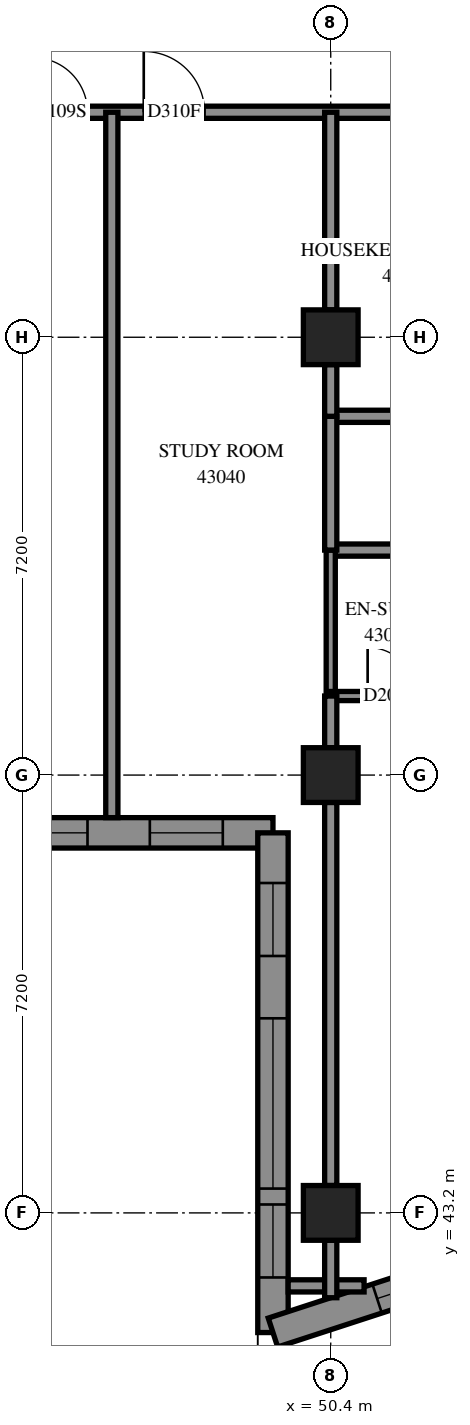
"""IFC4 building model, lengths in metres.
Left out: names, types, materials, properties, quantities, classifications, styles, units other than length and angle.
Written with IfcOpenShell. Run it as: python <this file> out.ifc"""

import sys

from ifc_helpers import new_model, si_unit, direction, frame, frame_2d, origin, origin_2d, place, context, subcontext, project, spatial, polyline, rectangle, outline, extrude, element, fill, save


model = new_model("IFC4")
c1 = context("Model", 3, precision=1e-05, world=origin(), true_north=direction((0.0, 1.0)))
c2 = subcontext(c1, "Body", "Model", "MODEL_VIEW")
j1 = project(units=[si_unit("LENGTHUNIT", "METRE"), si_unit("PLANEANGLEUNIT", "RADIAN")], contexts=[c1])
p1 = place(None, origin())
s1 = spatial("IfcSite", under=j1, at=p1, CompositionType="ELEMENT")
p2 = place(p1, origin())
s2 = spatial("IfcBuilding", under=s1, at=p2, CompositionType="ELEMENT")
p3 = place(p2, frame((0.0, 0.0, 159.2)))
s3 = spatial("IfcBuildingStorey", under=s2, at=p3, CompositionType="ELEMENT", Elevation=159.2)
for number, where, z_axis, x_axis in (
    (1, (50.4, 43.2, 0.0), (0.0, 0.0, 1.0), (1.0, 0.0, 0.0)),
    (2, (50.4, 50.4, 0.0), (0.0, 0.0, 1.0), (1.0, 0.0, 0.0)),
    (3, (50.4, 57.6, 0.0), (0.0, 0.0, 1.0), (1.0, 0.0, 0.0)),
):
    element("IfcColumn", number, at=place(p3, frame(where, z_axis=z_axis, x_axis=x_axis)), inside=s3, PredefinedType="COLUMN", context=c2, shape_type="SweptSolid", body=[
        extrude(rectangle(XDim=0.9, YDim=0.9, at=origin_2d()), origin(), (0.0, 0.0, 1.0), 3.1),
    ])
p4 = place(p3, frame((42.25, 49.45, 0.0), z_axis=(0.0, 0.0, 1.0), x_axis=(1.0, 0.0, 0.0)))
e4 = element("IfcWall", 4, at=p4, inside=s3, PredefinedType="SOLIDWALL", context=c2, shape_type="SweptSolid", body=[
    extrude(outline(polyline([(-0.25, -0.25), (6.95, -0.25), (7.45, 0.25), (0.25, 0.25), (-0.25, -0.25)])), origin(), (0.0, 0.0, 1.0), 3.1),
])
p5 = place(p4, frame((1.35, 0.0, 0.45)))
e5 = element("IfcOpeningElement", 5, at=p5, cuts=e4, PredefinedType="OPENING", context=c2, shape_type="SweptSolid", body=[
    extrude(rectangle(XDim=2.8, YDim=2.5, at=frame_2d((1.4, 1.25))), frame((0.0, 0.26, 0.0), z_axis=(0.0, -1.0, 0.0), x_axis=(1.0, 0.0, 0.0)), (0.0, 0.0, 1.0), 0.52),
])
p6 = place(p4, frame((5.175, 0.0, 0.45)))
e6 = element("IfcOpeningElement", 6, at=p6, cuts=e4, PredefinedType="OPENING", context=c2, shape_type="SweptSolid", body=[
    extrude(rectangle(XDim=1.2, YDim=2.5, at=frame_2d((0.6, 1.25))), frame((0.0, 0.26, 0.0), z_axis=(0.0, -1.0, 0.0), x_axis=(1.0, 0.0, 0.0)), (0.0, 0.0, 1.0), 0.52),
])
p7 = place(p3, frame((49.45, 49.45, 0.0), z_axis=(0.0, 0.0, 1.0), x_axis=(0.0, -1.0, 0.0)))
e7 = element("IfcWall", 7, at=p7, inside=s3, PredefinedType="SOLIDWALL", context=c2, shape_type="SweptSolid", body=[
    extrude(outline(polyline([(0.25, -0.25), (8.562, -0.25), (7.873, 0.25), (-0.25, 0.25), (0.25, -0.25)])), origin(), (0.0, 0.0, 1.0), 3.1),
])
p8 = place(p7, frame((3.05, 0.0, 0.45)))
e8 = element("IfcOpeningElement", 8, at=p8, cuts=e7, PredefinedType="OPENING", context=c2, shape_type="SweptSolid", body=[
    extrude(rectangle(XDim=2.8, YDim=2.5, at=frame_2d((1.4, 1.25))), frame((0.0, 0.26, 0.0), z_axis=(0.0, -1.0, 0.0), x_axis=(1.0, 0.0, 0.0)), (0.0, 0.0, 1.0), 0.52),
])
p9 = place(p7, frame((0.825, 0.0, 0.45)))
e9 = element("IfcOpeningElement", 9, at=p9, cuts=e7, PredefinedType="OPENING", context=c2, shape_type="SweptSolid", body=[
    extrude(rectangle(XDim=1.2, YDim=2.5, at=frame_2d((0.6, 1.25))), frame((0.0, 0.26, 0.0), z_axis=(0.0, -1.0, 0.0), x_axis=(1.0, 0.0, 0.0)), (0.0, 0.0, 1.0), 0.52),
])
p10 = place(p7, frame((6.112, 0.0, 0.45)))
e10 = element("IfcOpeningElement", 10, at=p10, cuts=e7, PredefinedType="OPENING", context=c2, shape_type="SweptSolid", body=[
    extrude(rectangle(XDim=1.2, YDim=2.5, at=frame_2d((0.6, 1.25))), frame((0.0, 0.26, 0.0), z_axis=(0.0, -1.0, 0.0), x_axis=(1.0, 0.0, 0.0)), (0.0, 0.0, 1.0), 0.52),
])
p11 = place(p3, frame((49.45, 41.232, 0.0), z_axis=(0.0, 0.0, 1.0), x_axis=(0.9507752204, 0.3098813971, 0.0)))
e11 = element("IfcWall", 11, at=p11, inside=s3, PredefinedType="SOLIDWALL", context=c2, shape_type="SweptSolid", body=[
    extrude(outline(polyline([(-0.344, -0.25), (3.244, -0.25), (3.362, 0.25), (0.344, 0.25), (-0.344, -0.25)])), origin(), (0.0, 0.0, 1.0), 3.1),
])
p12 = place(p11, frame((1.801, 0.0, 0.45)))
e12 = element("IfcOpeningElement", 12, at=p12, cuts=e11, PredefinedType="OPENING", context=c2, shape_type="SweptSolid", body=[
    extrude(rectangle(XDim=1.2, YDim=2.5, at=frame_2d((0.6, 1.25))), frame((0.0, 0.26, 0.0), z_axis=(0.0, -1.0, 0.0), x_axis=(1.0, 0.0, 0.0)), (0.0, 0.0, 1.0), 0.52),
])
p13 = place(p3, frame((36.0, 61.3, 0.0), z_axis=(0.0, 0.0, 1.0), x_axis=(1.0, 0.0, 0.0)))
e13 = element("IfcWall", 13, at=p13, inside=s3, PredefinedType="PARTITIONING", context=c2, shape_type="SweptSolid", body=[
    extrude(rectangle(XDim=16.9, YDim=0.2, at=frame_2d((8.45, 0.0))), origin(), (0.0, 0.0, 1.0), 3.1),
])
p14 = place(p13, frame((2.3, 0.0, 0.0)))
e14 = element("IfcOpeningElement", 14, at=p14, cuts=e13, PredefinedType="OPENING", context=c2, shape_type="SweptSolid", body=[
    extrude(rectangle(XDim=0.9, YDim=2.1, at=frame_2d((0.45, 1.05))), frame((0.0, 0.11, 0.0), z_axis=(0.0, -1.0, 0.0), x_axis=(1.0, 0.0, 0.0)), (0.0, 0.0, 1.0), 0.22),
])
p15 = place(p13, frame((4.125, 0.0, 0.0)))
e15 = element("IfcOpeningElement", 15, at=p15, cuts=e13, PredefinedType="OPENING", context=c2, shape_type="SweptSolid", body=[
    extrude(rectangle(XDim=1.0, YDim=2.1, at=frame_2d((0.5, 1.05))), frame((0.0, 0.11, 0.0), z_axis=(0.0, -1.0, 0.0), x_axis=(1.0, 0.0, 0.0)), (0.0, 0.0, 1.0), 0.22),
])
p16 = place(p13, frame((9.5, 0.0, 0.0)))
e16 = element("IfcOpeningElement", 16, at=p16, cuts=e13, PredefinedType="OPENING", context=c2, shape_type="SweptSolid", body=[
    extrude(rectangle(XDim=0.9, YDim=2.1, at=frame_2d((0.45, 1.05))), frame((0.0, 0.11, 0.0), z_axis=(0.0, -1.0, 0.0), x_axis=(1.0, 0.0, 0.0)), (0.0, 0.0, 1.0), 0.22),
])
p17 = place(p13, frame((11.325, 0.0, 0.0)))
e17 = element("IfcOpeningElement", 17, at=p17, cuts=e13, PredefinedType="OPENING", context=c2, shape_type="SweptSolid", body=[
    extrude(rectangle(XDim=1.0, YDim=2.1, at=frame_2d((0.5, 1.05))), frame((0.0, 0.11, 0.0), z_axis=(0.0, -1.0, 0.0), x_axis=(1.0, 0.0, 0.0)), (0.0, 0.0, 1.0), 0.22),
])
p18 = place(p13, frame((15.647, 0.0, 0.0)))
e18 = element("IfcOpeningElement", 18, at=p18, cuts=e13, PredefinedType="OPENING", context=c2, shape_type="SweptSolid", body=[
    extrude(rectangle(XDim=1.0, YDim=2.1, at=frame_2d((0.5, 1.05))), frame((0.0, 0.11, 0.0), z_axis=(0.0, -1.0, 0.0), x_axis=(1.0, 0.0, 0.0)), (0.0, 0.0, 1.0), 0.22),
])
p19 = place(p3, frame((46.8, 49.7, 0.0), z_axis=(0.0, 0.0, 1.0), x_axis=(0.0, 1.0, 0.0)))
e19 = element("IfcWall", 19, at=p19, inside=s3, PredefinedType="PARTITIONING", context=c2, shape_type="SweptSolid", body=[
    extrude(rectangle(XDim=11.6, YDim=0.2, at=frame_2d((5.8, 0.0))), origin(), (0.0, 0.0, 1.0), 3.1),
])
p20 = place(p3, frame((50.4, 43.65, 0.0), z_axis=(0.0, 0.0, 1.0), x_axis=(0.0, 1.0, 0.0)))
e20 = element("IfcWall", 20, at=p20, inside=s3, PredefinedType="PARTITIONING", context=c2, shape_type="SweptSolid", body=[
    extrude(rectangle(XDim=6.3, YDim=0.2, at=frame_2d((3.15, 0.0))), origin(), (0.0, 0.0, 1.0), 2.6),
])
p21 = place(p3, frame((50.4, 54.1, 0.0), z_axis=(0.0, 0.0, 1.0), x_axis=(1.0, 0.0, 0.0)))
e21 = element("IfcWall", 21, at=p21, inside=s3, PredefinedType="PARTITIONING", context=c2, shape_type="SweptSolid", body=[
    extrude(rectangle(XDim=4.5, YDim=0.2, at=frame_2d((2.25, 0.0))), origin(), (0.0, 0.0, 1.0), 3.1),
])
p22 = place(p21, frame((2.3, 0.0, 0.0)))
e22 = element("IfcOpeningElement", 22, at=p22, cuts=e21, PredefinedType="OPENING", context=c2, shape_type="SweptSolid", body=[
    extrude(rectangle(XDim=0.9, YDim=2.1, at=frame_2d((0.45, 1.05))), frame((0.0, 0.11, 0.0), z_axis=(0.0, -1.0, 0.0), x_axis=(1.0, 0.0, 0.0)), (0.0, 0.0, 1.0), 0.22),
])
p23 = place(p3, frame((50.4, 58.05, 0.0), z_axis=(0.0, 0.0, 1.0), x_axis=(0.0, 1.0, 0.0)))
e23 = element("IfcWall", 23, at=p23, inside=s3, PredefinedType="PARTITIONING", context=c2, shape_type="SweptSolid", body=[
    extrude(rectangle(XDim=3.25, YDim=0.2, at=frame_2d((1.625, 0.0))), origin(), (0.0, 0.0, 1.0), 3.1),
])
p24 = place(p3, frame((50.4, 56.3, 0.0), z_axis=(0.0, 0.0, 1.0), x_axis=(1.0, 0.0, 0.0)))
e24 = element("IfcWall", 24, at=p24, inside=s3, PredefinedType="PARTITIONING", context=c2, shape_type="SweptSolid", body=[
    extrude(rectangle(XDim=2.5, YDim=0.2, at=frame_2d((1.25, 0.0))), origin(), (0.0, 0.0, 1.0), 3.1),
])
p25 = place(p3, frame((50.4, 51.7, 0.0), z_axis=(0.0, 0.0, 1.0), x_axis=(0.0, 1.0, 0.0)))
e25 = element("IfcWall", 25, at=p25, inside=s3, PredefinedType="PARTITIONING", context=c2, shape_type="SweptSolid", body=[
    extrude(rectangle(XDim=2.4, YDim=0.15, at=frame_2d((1.2, 0.0))), origin(), (0.0, 0.0, 1.0), 3.1),
])
p26 = place(p3, frame((50.4, 54.1, 0.0), z_axis=(0.0, 0.0, 1.0), x_axis=(0.0, 1.0, 0.0)))
e26 = element("IfcWall", 26, at=p26, inside=s3, PredefinedType="PARTITIONING", context=c2, shape_type="SweptSolid", body=[
    extrude(rectangle(XDim=2.2, YDim=0.2, at=frame_2d((1.1, 0.0))), origin(), (0.0, 0.0, 1.0), 3.1),
])
p27 = place(p3, frame((50.4, 51.7, 0.0), z_axis=(0.0, 0.0, 1.0), x_axis=(1.0, 0.0, 0.0)))
e27 = element("IfcWall", 27, at=p27, inside=s3, PredefinedType="PARTITIONING", context=c2, shape_type="SweptSolid", body=[
    extrude(rectangle(XDim=1.9, YDim=0.15, at=frame_2d((0.95, 0.0))), origin(), (0.0, 0.0, 1.0), 3.1),
])
p28 = place(p27, frame((0.607, 0.0, 0.0)))
e28 = element("IfcOpeningElement", 28, at=p28, cuts=e27, PredefinedType="OPENING", context=c2, shape_type="SweptSolid", body=[
    extrude(rectangle(XDim=0.8, YDim=2.1, at=frame_2d((0.4, 1.05))), frame((0.0, 0.085, 0.0), z_axis=(0.0, -1.0, 0.0), x_axis=(1.0, 0.0, 0.0)), (0.0, 0.0, 1.0), 0.17),
])
p29 = place(p3, frame((49.7, 42.0, 0.0), z_axis=(0.0, 0.0, 1.0), x_axis=(1.0, 0.0, 0.0)))
e29 = element("IfcWall", 29, at=p29, inside=s3, PredefinedType="PARTITIONING", context=c2, shape_type="SweptSolid", body=[
    extrude(rectangle(XDim=1.248, YDim=0.2, at=frame_2d((0.624, 0.0))), origin(), (0.0, 0.0, 1.0), 3.1),
])
for number, where, z_axis, x_axis in (
    (30, (50.4, 50.85, 0.0), (0.0, 0.0, 1.0), (0.0, 1.0, 0.0)),
    (31, (50.4, 56.3, 0.0), (0.0, 0.0, 1.0), (0.0, 1.0, 0.0)),
):
    element("IfcWall", number, at=place(p3, frame(where, z_axis=z_axis, x_axis=x_axis)), inside=s3, PredefinedType="PARTITIONING", context=c2, shape_type="SweptSolid", body=[
        extrude(rectangle(XDim=0.85, YDim=0.2, at=frame_2d((0.425, 0.0))), origin(), (0.0, 0.0, 1.0), 3.1),
    ])
p30 = place(p3, frame((50.4, 41.805, 0.0), z_axis=(0.0, 0.0, 1.0), x_axis=(0.0, 1.0, 0.0)))
e32 = element("IfcWall", 32, at=p30, inside=s3, PredefinedType="PARTITIONING", context=c2, shape_type="SweptSolid", body=[
    extrude(rectangle(XDim=0.945, YDim=0.2, at=frame_2d((0.472, 0.0))), origin(), (0.0, 0.0, 1.0), 3.1),
])
p31 = place(p5, origin())
e33 = element("IfcWindow", 33, at=p31, inside=s3, PartitioningType="SINGLE_PANEL", PredefinedType="WINDOW", context=c2, shape_type="SweptSolid", body=[
    extrude(rectangle(XDim=2.8, YDim=2.5, at=frame_2d((1.4, 1.25))), frame((0.0, 0.18, 0.0), z_axis=(0.0, -1.0, 0.0), x_axis=(1.0, 0.0, 0.0)), (0.0, 0.0, 1.0), 0.06),
])
fill(e5, e33)
p32 = place(p6, origin())
e34 = element("IfcWindow", 34, at=p32, inside=s3, PartitioningType="SINGLE_PANEL", PredefinedType="WINDOW", context=c2, shape_type="SweptSolid", body=[
    extrude(rectangle(XDim=1.2, YDim=2.5, at=frame_2d((0.6, 1.25))), frame((0.0, 0.18, 0.0), z_axis=(0.0, -1.0, 0.0), x_axis=(1.0, 0.0, 0.0)), (0.0, 0.0, 1.0), 0.06),
])
fill(e6, e34)
p33 = place(p8, origin())
e35 = element("IfcWindow", 35, at=p33, inside=s3, PartitioningType="SINGLE_PANEL", PredefinedType="WINDOW", context=c2, shape_type="SweptSolid", body=[
    extrude(rectangle(XDim=2.8, YDim=2.5, at=frame_2d((1.4, 1.25))), frame((0.0, 0.18, 0.0), z_axis=(0.0, -1.0, 0.0), x_axis=(1.0, 0.0, 0.0)), (0.0, 0.0, 1.0), 0.06),
])
fill(e8, e35)
p34 = place(p9, origin())
e36 = element("IfcWindow", 36, at=p34, inside=s3, PartitioningType="SINGLE_PANEL", PredefinedType="WINDOW", context=c2, shape_type="SweptSolid", body=[
    extrude(rectangle(XDim=1.2, YDim=2.5, at=frame_2d((0.6, 1.25))), frame((0.0, 0.18, 0.0), z_axis=(0.0, -1.0, 0.0), x_axis=(1.0, 0.0, 0.0)), (0.0, 0.0, 1.0), 0.06),
])
fill(e9, e36)
p35 = place(p10, origin())
e37 = element("IfcWindow", 37, at=p35, inside=s3, PartitioningType="SINGLE_PANEL", PredefinedType="WINDOW", context=c2, shape_type="SweptSolid", body=[
    extrude(rectangle(XDim=1.2, YDim=2.5, at=frame_2d((0.6, 1.25))), frame((0.0, 0.18, 0.0), z_axis=(0.0, -1.0, 0.0), x_axis=(1.0, 0.0, 0.0)), (0.0, 0.0, 1.0), 0.06),
])
fill(e10, e37)
p36 = place(p12, origin())
e38 = element("IfcWindow", 38, at=p36, inside=s3, PartitioningType="SINGLE_PANEL", PredefinedType="WINDOW", context=c2, shape_type="SweptSolid", body=[
    extrude(rectangle(XDim=1.2, YDim=2.5, at=frame_2d((0.6, 1.25))), frame((0.0, 0.18, 0.0), z_axis=(0.0, -1.0, 0.0), x_axis=(1.0, 0.0, 0.0)), (0.0, 0.0, 1.0), 0.06),
])
fill(e12, e38)
p37 = place(p16, origin())
e39 = element("IfcDoor", 39, at=p37, inside=s3, OperationType="SINGLE_SWING_LEFT", PredefinedType="DOOR", context=c2, shape_type="SweptSolid", body=[
    extrude(rectangle(XDim=0.9, YDim=2.1, at=frame_2d((0.45, 1.05))), frame((0.0, 0.025, 0.0), z_axis=(0.0, -1.0, 0.0), x_axis=(1.0, 0.0, 0.0)), (0.0, 0.0, 1.0), 0.05),
])
fill(e16, e39)
p38 = place(p17, origin())
e40 = element("IfcDoor", 40, at=p38, inside=s3, OperationType="SINGLE_SWING_RIGHT", PredefinedType="DOOR", context=c2, shape_type="SweptSolid", body=[
    extrude(rectangle(XDim=1.0, YDim=2.1, at=frame_2d((0.5, 1.05))), frame((0.0, 0.025, 0.0), z_axis=(0.0, -1.0, 0.0), x_axis=(1.0, 0.0, 0.0)), (0.0, 0.0, 1.0), 0.05),
])
fill(e17, e40)
p39 = place(p28, origin())
e41 = element("IfcDoor", 41, at=p39, inside=s3, OperationType="SINGLE_SWING_RIGHT", PredefinedType="DOOR", context=c2, shape_type="SweptSolid", body=[
    extrude(rectangle(XDim=0.8, YDim=2.1, at=frame_2d((0.4, 1.05))), frame((0.0, 0.025, 0.0), z_axis=(0.0, -1.0, 0.0), x_axis=(1.0, 0.0, 0.0)), (0.0, 0.0, 1.0), 0.05),
])
fill(e28, e41)
save(model, sys.argv[1])
